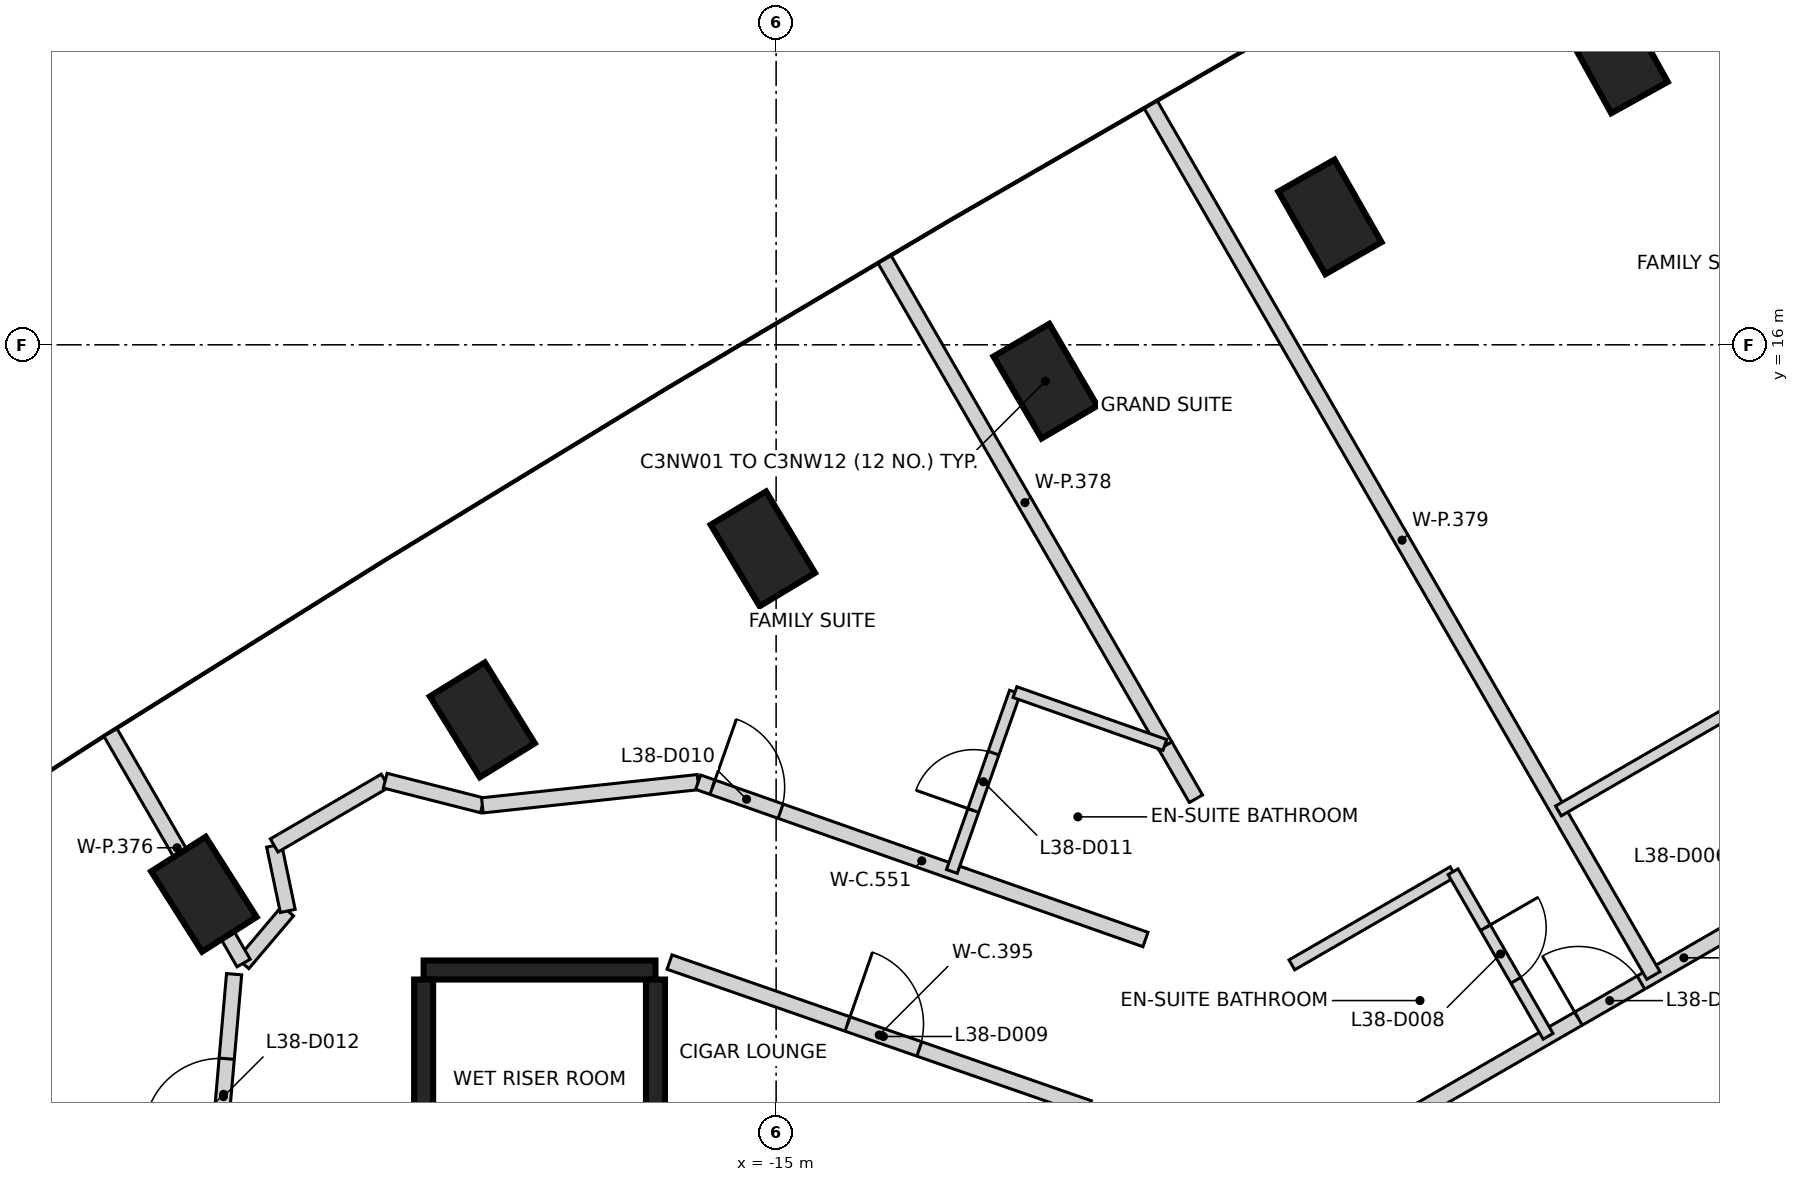
"""IFC4 building model, lengths in metres.
Left out: names, types, materials, properties, quantities, classifications, styles, units other than length and angle.
Written with IfcOpenShell. Run it as: python <this file> out.ifc"""

import sys

from ifc_helpers import new_model, si_unit, direction, frame, frame_2d, origin, origin_2d, place, context, subcontext, project, spatial, rectangle, extrude, element, fill, save


model = new_model("IFC4")
c1 = context("Model", 3, precision=1e-05, world=origin(), true_north=direction((0.0, 1.0)))
c2 = subcontext(c1, "Body", "Model", "MODEL_VIEW")
j1 = project(units=[si_unit("LENGTHUNIT", "METRE"), si_unit("PLANEANGLEUNIT", "RADIAN")], contexts=[c1])
p1 = place(None, origin())
s1 = spatial("IfcSite", under=j1, at=p1, CompositionType="ELEMENT")
p2 = place(p1, origin())
s2 = spatial("IfcBuilding", under=s1, at=p2, CompositionType="ELEMENT")
p3 = place(p2, frame((0.0, 0.0, 154.0)))
s3 = spatial("IfcBuildingStorey", under=s2, at=p3, CompositionType="ELEMENT", Elevation=154.0)
for number, where, z_axis, x_axis in (
    (1, (-3.945, 19.8, -0.4), (0.0, 0.0, 1.0), (-0.485, 0.875, 0.0)),
    (2, (-7.714, 17.683, -0.4), (0.0, 0.0, 1.0), (-0.495, 0.869, 0.0)),
    (3, (-11.457, 15.522, -0.4), (0.0, 0.0, 1.0), (-0.505, 0.863, 0.0)),
    (4, (-15.175, 13.316, -0.4), (0.0, 0.0, 1.0), (-0.515, 0.857, 0.0)),
    (5, (-18.865, 11.066, -0.4), (0.0, 0.0, 1.0), (-0.526, 0.851, 0.0)),
    (6, (-22.529, 8.772, -0.4), (0.0, 0.0, 1.0), (-0.536, 0.844, 0.0)),
):
    element("IfcColumn", number, at=place(p3, frame(where, z_axis=z_axis, x_axis=x_axis)), inside=s3, PredefinedType="COLUMN", context=c2, shape_type="SweptSolid", body=[
        extrude(rectangle(XDim=1.25, YDim=0.85, at=origin_2d()), origin(), (0.0, 0.0, 1.0), 3.6),
    ])
p4 = place(p3, frame((-19.637, 7.775, 0.0), z_axis=(0.0, 0.0, 1.0), x_axis=(1.0, 0.0, 0.0)))
e7 = element("IfcWall", 7, at=p4, inside=s3, PredefinedType="SHEAR", context=c2, shape_type="SweptSolid", body=[
    extrude(rectangle(XDim=3.05, YDim=0.25, at=frame_2d((1.525, 0.0))), origin(), (0.0, 0.0, 1.0), 3.2),
])
for number, where, z_axis, x_axis in (
    (8, (-16.587, 7.65, 0.0), (0.0, 0.0, 1.0), (0.0, -1.0, 0.0)),
    (9, (-19.637, 4.785, 0.0), (0.0, 0.0, 1.0), (0.0, 1.0, 0.0)),
):
    element("IfcWall", number, at=place(p3, frame(where, z_axis=z_axis, x_axis=x_axis)), inside=s3, PredefinedType="SHEAR", context=c2, shape_type="SweptSolid", body=[
        extrude(rectangle(XDim=2.865, YDim=0.25, at=frame_2d((1.432, 0.0))), origin(), (0.0, 0.0, 1.0), 3.2),
    ])
p5 = place(p3, frame((-22.407, 4.56, 0.0), z_axis=(0.0, 0.0, 1.0), x_axis=(0.086898645684, 0.996217157741, 0.0)))
e10 = element("IfcWall", 10, at=p5, inside=s3, PredefinedType="PARTITIONING", context=c2, shape_type="SweptSolid", body=[
    extrude(rectangle(XDim=3.172, YDim=0.2, at=frame_2d((1.586, 0.0))), origin(), (0.0, 0.0, 1.0), 3.2),
])
p6 = place(p5, frame((1.056, 0.0, 0.0)))
e11 = element("IfcOpeningElement", 11, at=p6, cuts=e10, PredefinedType="OPENING", context=c2, shape_type="SweptSolid", body=[
    extrude(rectangle(XDim=1.0, YDim=2.1, at=frame_2d((0.5, 1.05))), frame((0.0, 0.11, 0.0), z_axis=(0.0, -1.0, 0.0), x_axis=(1.0, 0.0, 0.0)), (0.0, 0.0, 1.0), 0.22),
])
p7 = place(p3, frame((-22.013, 7.858, 0.0), z_axis=(0.0, 0.0, 1.0), x_axis=(0.646315152402, 0.763070588986, 0.0)))
e12 = element("IfcWall", 12, at=p7, inside=s3, PredefinedType="PARTITIONING", context=c2, shape_type="SweptSolid", body=[
    extrude(rectangle(XDim=0.91, YDim=0.2, at=frame_2d((0.455, 0.0))), origin(), (0.0, 0.0, 1.0), 3.2),
])
p8 = place(p3, frame((-21.605, 9.412, 0.0), z_axis=(0.0, 0.0, 1.0), x_axis=(0.204764111512, -0.978811349871, 0.0)))
e13 = element("IfcWall", 13, at=p8, inside=s3, PredefinedType="PARTITIONING", context=c2, shape_type="SweptSolid", body=[
    extrude(rectangle(XDim=0.879, YDim=0.2, at=frame_2d((0.439, 0.0))), origin(), (0.0, 0.0, 1.0), 2.3),
])
p9 = place(p3, frame((-21.604, 9.413, 0.0), z_axis=(0.0, 0.0, 1.0), x_axis=(0.863736988548, 0.503942868402, 0.0)))
e14 = element("IfcWall", 14, at=p9, inside=s3, PredefinedType="PARTITIONING", context=c2, shape_type="SweptSolid", body=[
    extrude(rectangle(XDim=1.69, YDim=0.2, at=frame_2d((0.845, 0.0))), origin(), (0.0, 0.0, 1.0), 2.3),
])
p10 = place(p3, frame((-20.143, 10.266, 0.0), z_axis=(0.0, 0.0, 1.0), x_axis=(0.969121308325, -0.246584447505, 0.0)))
e15 = element("IfcWall", 15, at=p10, inside=s3, PredefinedType="PARTITIONING", context=c2, shape_type="SweptSolid", body=[
    extrude(rectangle(XDim=1.319, YDim=0.2, at=frame_2d((0.659, 0.0))), origin(), (0.0, 0.0, 1.0), 2.3),
])
p11 = place(p3, frame((-18.865, 9.941, 0.0), z_axis=(0.0, 0.0, 1.0), x_axis=(0.99423123086, 0.107257911519, 0.0)))
e16 = element("IfcWall", 16, at=p11, inside=s3, PredefinedType="PARTITIONING", context=c2, shape_type="SweptSolid", body=[
    extrude(rectangle(XDim=2.854, YDim=0.2, at=frame_2d((1.427, 0.0))), origin(), (0.0, 0.0, 1.0), 3.2),
])
p12 = place(p3, frame((-16.402, 7.879, 0.0), z_axis=(0.0, 0.0, 1.0), x_axis=(0.94449961557, -0.328512520596, 0.0)))
e17 = element("IfcWall", 17, at=p12, inside=s3, PredefinedType="PARTITIONING", context=c2, shape_type="SweptSolid", body=[
    extrude(rectangle(XDim=5.842, YDim=0.2, at=frame_2d((2.921, 0.0))), origin(), (0.0, 0.0, 1.0), 3.2),
])
p13 = place(p12, frame((2.479, 0.0, 0.0)))
e18 = element("IfcOpeningElement", 18, at=p13, cuts=e17, PredefinedType="OPENING", context=c2, shape_type="SweptSolid", body=[
    extrude(rectangle(XDim=1.0, YDim=2.1, at=frame_2d((0.5, 1.05))), frame((0.0, 0.11, 0.0), z_axis=(0.0, -1.0, 0.0), x_axis=(1.0, 0.0, 0.0)), (0.0, 0.0, 1.0), 0.22),
])
p14 = place(p3, frame((-16.026, 10.246, 0.0), z_axis=(0.0, 0.0, 1.0), x_axis=(0.943337348352, -0.331835271187, 0.0)))
e19 = element("IfcWall", 19, at=p14, inside=s3, PredefinedType="PARTITIONING", context=c2, shape_type="SweptSolid", body=[
    extrude(rectangle(XDim=6.238, YDim=0.2, at=frame_2d((3.119, 0.0))), origin(), (0.0, 0.0, 1.0), 3.2),
])
p15 = place(p14, frame((0.2, 0.0, 0.0)))
e20 = element("IfcOpeningElement", 20, at=p15, cuts=e19, PredefinedType="OPENING", context=c2, shape_type="SweptSolid", body=[
    extrude(rectangle(XDim=0.95, YDim=2.1, at=frame_2d((0.475, 1.05))), frame((0.0, 0.11, 0.0), z_axis=(0.0, -1.0, 0.0), x_axis=(1.0, 0.0, 0.0)), (0.0, 0.0, 1.0), 0.22),
])
p16 = place(p3, frame((-8.612, 2.418, 0.0), z_axis=(0.0, 0.0, 1.0), x_axis=(0.866019033094, 0.500011034197, 0.0)))
e21 = element("IfcWall", 21, at=p16, inside=s3, PredefinedType="PARTITIONING", context=c2, shape_type="SweptSolid", body=[
    extrude(rectangle(XDim=12.498, YDim=0.2, at=frame_2d((6.249, 0.0))), origin(), (0.0, 0.0, 1.0), 3.2),
])
p17 = place(p16, frame((9.346, 0.0, 0.0)))
e22 = element("IfcOpeningElement", 22, at=p17, cuts=e21, PredefinedType="OPENING", context=c2, shape_type="SweptSolid", body=[
    extrude(rectangle(XDim=0.9, YDim=2.1, at=frame_2d((0.45, 1.05))), frame((0.0, 0.11, 0.0), z_axis=(0.0, -1.0, 0.0), x_axis=(1.0, 0.0, 0.0)), (0.0, 0.0, 1.0), 0.22),
])
p18 = place(p16, frame((3.109, 0.0, 0.0)))
e23 = element("IfcOpeningElement", 23, at=p18, cuts=e21, PredefinedType="OPENING", context=c2, shape_type="SweptSolid", body=[
    extrude(rectangle(XDim=0.9, YDim=2.1, at=frame_2d((0.45, 1.05))), frame((0.0, 0.11, 0.0), z_axis=(0.0, -1.0, 0.0), x_axis=(1.0, 0.0, 0.0)), (0.0, 0.0, 1.0), 0.22),
])
p19 = place(p3, frame((-6.976, 5.674, 0.0), z_axis=(0.0, 0.0, 1.0), x_axis=(0.8661469583, 0.499789402276, 0.0)))
e24 = element("IfcWall", 24, at=p19, inside=s3, PredefinedType="PARTITIONING", context=c2, shape_type="SweptSolid", body=[
    extrude(rectangle(XDim=9.05, YDim=0.2, at=frame_2d((4.525, 0.0))), origin(), (0.0, 0.0, 1.0), 3.2),
])
p20 = place(p19, frame((7.852, 0.0, 0.0)))
e25 = element("IfcOpeningElement", 25, at=p20, cuts=e24, PredefinedType="OPENING", context=c2, shape_type="SweptSolid", body=[
    extrude(rectangle(XDim=0.95, YDim=2.1, at=frame_2d((0.475, 1.05))), frame((0.0, 0.11, 0.0), z_axis=(0.0, -1.0, 0.0), x_axis=(1.0, 0.0, 0.0)), (0.0, 0.0, 1.0), 0.22),
])
p21 = place(p19, frame((2.923, 0.0, 0.0)))
e26 = element("IfcOpeningElement", 26, at=p21, cuts=e24, PredefinedType="OPENING", context=c2, shape_type="SweptSolid", body=[
    extrude(rectangle(XDim=0.95, YDim=2.1, at=frame_2d((0.475, 1.05))), frame((0.0, 0.11, 0.0), z_axis=(0.0, -1.0, 0.0), x_axis=(1.0, 0.0, 0.0)), (0.0, 0.0, 1.0), 0.22),
])
p22 = place(p3, frame((-23.758, 10.9, 0.0), z_axis=(0.0, 0.0, 1.0), x_axis=(0.500112665219, -0.865960346718, 0.0)))
e27 = element("IfcWall", 27, at=p22, inside=s3, PredefinedType="PARTITIONING", context=c2, shape_type="SweptSolid", body=[
    extrude(rectangle(XDim=3.502, YDim=0.2, at=frame_2d((1.751, 0.0))), origin(), (0.0, 0.0, 1.0), 3.2),
])
p23 = place(p3, frame((-13.573, 17.122, 0.0), z_axis=(0.0, 0.0, 1.0), x_axis=(0.49998952864, -0.866031449343, 0.0)))
e28 = element("IfcWall", 28, at=p23, inside=s3, PredefinedType="PARTITIONING", context=c2, shape_type="SweptSolid", body=[
    extrude(rectangle(XDim=7.385, YDim=0.2, at=frame_2d((3.693, 0.0))), origin(), (0.0, 0.0, 1.0), 2.3),
])
p24 = place(p3, frame((-10.071, 19.158, 0.0), z_axis=(0.0, 0.0, 1.0), x_axis=(0.499905140254, -0.866080164158, 0.0)))
e29 = element("IfcWall", 29, at=p24, inside=s3, PredefinedType="PARTITIONING", context=c2, shape_type="SweptSolid", body=[
    extrude(rectangle(XDim=13.227, YDim=0.2, at=frame_2d((6.613, 0.0))), origin(), (0.0, 0.0, 1.0), 2.3),
])
p25 = place(p3, frame((-9.88, 10.726, 0.0), z_axis=(0.0, 0.0, 1.0), x_axis=(0.499626274598, -0.866241066754, 0.0)))
e30 = element("IfcWall", 30, at=p25, inside=s3, PredefinedType="PARTITIONING", context=c2, shape_type="SweptSolid", body=[
    extrude(rectangle(XDim=0.806, YDim=0.2, at=frame_2d((0.403, 0.0))), origin(), (0.0, 0.0, 1.0), 3.2),
])
p26 = place(p3, frame((-8.0, 0.925, 0.0), z_axis=(0.0, 0.0, 1.0), x_axis=(0.866075250037, 0.499913653818, 0.0)))
e31 = element("IfcWall", 31, at=p26, inside=s3, PredefinedType="PARTITIONING", context=c2, shape_type="SweptSolid", body=[
    extrude(rectangle(XDim=12.932, YDim=0.2, at=frame_2d((6.466, 0.0))), origin(), (0.0, 0.0, 1.0), 2.3),
])
p27 = place(p3, frame((-12.688, 9.072, 0.0), z_axis=(0.0, 0.0, 1.0), x_axis=(0.331941604797, 0.943299936926, 0.0)))
e32 = element("IfcWall", 32, at=p27, inside=s3, PredefinedType="PARTITIONING", context=c2, shape_type="SweptSolid", body=[
    extrude(rectangle(XDim=2.501, YDim=0.15, at=frame_2d((1.25, 0.0))), origin(), (0.0, 0.0, 1.0), 3.2),
])
p28 = place(p27, frame((0.85, 0.0, 0.0)))
e33 = element("IfcOpeningElement", 33, at=p28, cuts=e32, PredefinedType="OPENING", context=c2, shape_type="SweptSolid", body=[
    extrude(rectangle(XDim=0.8, YDim=2.1, at=frame_2d((0.4, 1.05))), frame((0.0, 0.085, 0.0), z_axis=(0.0, -1.0, 0.0), x_axis=(1.0, 0.0, 0.0)), (0.0, 0.0, 1.0), 0.17),
])
p29 = place(p3, frame((-11.858, 11.431, 0.0), z_axis=(0.0, 0.0, 1.0), x_axis=(0.943162669368, -0.332331429617, 0.0)))
e34 = element("IfcWall", 34, at=p29, inside=s3, PredefinedType="PARTITIONING", context=c2, shape_type="SweptSolid", body=[
    extrude(rectangle(XDim=2.091, YDim=0.15, at=frame_2d((1.045, 0.0))), origin(), (0.0, 0.0, 1.0), 3.2),
])
p30 = place(p3, frame((-8.215, 7.843, 0.0), z_axis=(0.0, 0.0, 1.0), x_axis=(0.865983065851, 0.500073324283, 0.0)))
e35 = element("IfcWall", 35, at=p30, inside=s3, PredefinedType="PARTITIONING", context=c2, shape_type="SweptSolid", body=[
    extrude(rectangle(XDim=2.449, YDim=0.15, at=frame_2d((1.225, 0.0))), origin(), (0.0, 0.0, 1.0), 3.2),
])
p31 = place(p3, frame((-6.094, 9.068, 0.0), z_axis=(0.0, 0.0, 1.0), x_axis=(0.500004234368, -0.866022959057, 0.0)))
e36 = element("IfcWall", 36, at=p31, inside=s3, PredefinedType="PARTITIONING", context=c2, shape_type="SweptSolid", body=[
    extrude(rectangle(XDim=2.5, YDim=0.15, at=frame_2d((1.25, 0.0))), origin(), (0.0, 0.0, 1.0), 3.2),
])
p32 = place(p31, frame((0.85, 0.0, 0.0)))
e37 = element("IfcOpeningElement", 37, at=p32, cuts=e36, PredefinedType="OPENING", context=c2, shape_type="SweptSolid", body=[
    extrude(rectangle(XDim=0.8, YDim=2.1, at=frame_2d((0.4, 1.05))), frame((0.0, 0.085, 0.0), z_axis=(0.0, -1.0, 0.0), x_axis=(1.0, 0.0, 0.0)), (0.0, 0.0, 1.0), 0.17),
])
p33 = place(p3, frame((-4.708, 9.868, 0.0), z_axis=(0.0, 0.0, 1.0), x_axis=(0.865950438779, 0.500129820725, 0.0)))
e38 = element("IfcWall", 38, at=p33, inside=s3, PredefinedType="PARTITIONING", context=c2, shape_type="SweptSolid", body=[
    extrude(rectangle(XDim=2.698, YDim=0.15, at=frame_2d((1.349, 0.0))), origin(), (0.0, 0.0, 1.0), 3.2),
])
p34 = place(p21, origin())
e39 = element("IfcDoor", 39, at=p34, inside=s3, OperationType="SINGLE_SWING_LEFT", PredefinedType="DOOR", context=c2, shape_type="SweptSolid", body=[
    extrude(rectangle(XDim=0.95, YDim=2.1, at=frame_2d((0.475, 1.05))), frame((0.0, 0.025, 0.0), z_axis=(0.0, -1.0, 0.0), x_axis=(1.0, 0.0, 0.0)), (0.0, 0.0, 1.0), 0.05),
])
fill(e26, e39)
p35 = place(p32, frame((0.8, 0.0, 0.0), z_axis=(0.0, 0.0, 1.0), x_axis=(-1.0, 0.0, 0.0)))
e40 = element("IfcDoor", 40, at=p35, inside=s3, OperationType="SINGLE_SWING_LEFT", PredefinedType="DOOR", context=c2, shape_type="SweptSolid", body=[
    extrude(rectangle(XDim=0.8, YDim=2.1, at=frame_2d((0.4, 1.05))), frame((0.0, 0.025, 0.0), z_axis=(0.0, -1.0, 0.0), x_axis=(1.0, 0.0, 0.0)), (0.0, 0.0, 1.0), 0.05),
])
fill(e37, e40)
p36 = place(p13, frame((1.0, 0.0, 0.0), z_axis=(0.0, 0.0, 1.0), x_axis=(-1.0, 0.0, 0.0)))
e41 = element("IfcDoor", 41, at=p36, inside=s3, OperationType="SINGLE_SWING_LEFT", PredefinedType="DOOR", context=c2, shape_type="SweptSolid", body=[
    extrude(rectangle(XDim=1.0, YDim=2.1, at=frame_2d((0.5, 1.05))), frame((0.0, 0.025, 0.0), z_axis=(0.0, -1.0, 0.0), x_axis=(1.0, 0.0, 0.0)), (0.0, 0.0, 1.0), 0.05),
])
fill(e18, e41)
p37 = place(p15, origin())
e42 = element("IfcDoor", 42, at=p37, inside=s3, OperationType="SINGLE_SWING_LEFT", PredefinedType="DOOR", context=c2, shape_type="SweptSolid", body=[
    extrude(rectangle(XDim=0.95, YDim=2.1, at=frame_2d((0.475, 1.05))), frame((0.0, 0.025, 0.0), z_axis=(0.0, -1.0, 0.0), x_axis=(1.0, 0.0, 0.0)), (0.0, 0.0, 1.0), 0.05),
])
fill(e20, e42)
p38 = place(p28, origin())
e43 = element("IfcDoor", 43, at=p38, inside=s3, OperationType="SINGLE_SWING_LEFT", PredefinedType="DOOR", context=c2, shape_type="SweptSolid", body=[
    extrude(rectangle(XDim=0.8, YDim=2.1, at=frame_2d((0.4, 1.05))), frame((0.0, 0.025, 0.0), z_axis=(0.0, -1.0, 0.0), x_axis=(1.0, 0.0, 0.0)), (0.0, 0.0, 1.0), 0.05),
])
fill(e33, e43)
p39 = place(p6, origin())
e44 = element("IfcDoor", 44, at=p39, inside=s3, OperationType="SINGLE_SWING_LEFT", PredefinedType="DOOR", context=c2, shape_type="SweptSolid", body=[
    extrude(rectangle(XDim=1.0, YDim=2.1, at=frame_2d((0.5, 1.05))), frame((0.0, 0.025, 0.0), z_axis=(0.0, -1.0, 0.0), x_axis=(1.0, 0.0, 0.0)), (0.0, 0.0, 1.0), 0.05),
])
fill(e11, e44)
save(model, sys.argv[1])
